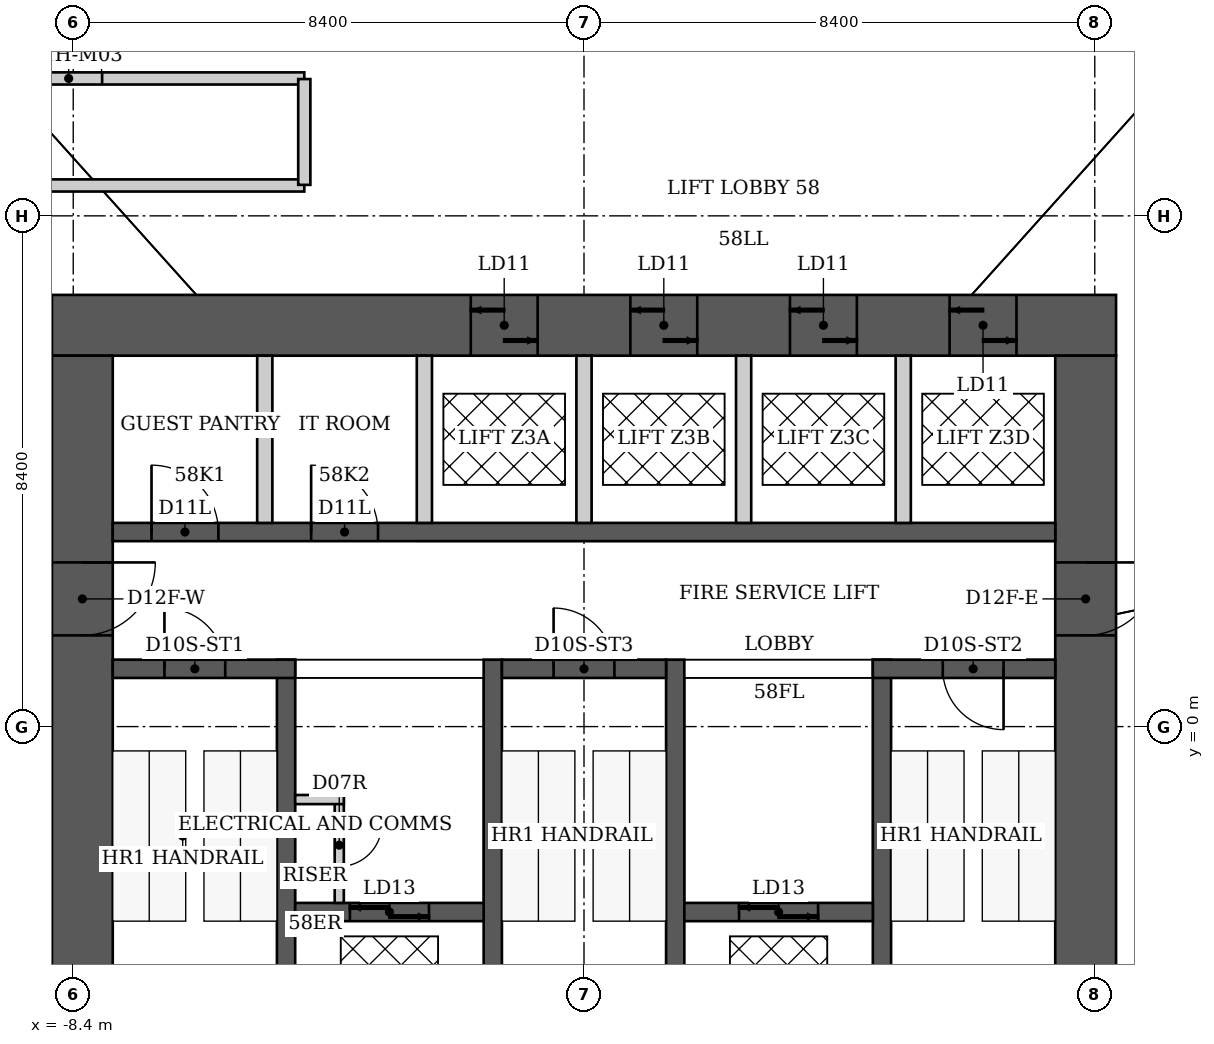
"""IFC4 building model, lengths in metres.
Left out: names, types, materials, properties, quantities, classifications, styles, units other than length and angle.
Written with IfcOpenShell. Run it as: python <this file> out.ifc"""

import sys

from ifc_helpers import new_model, si_unit, direction, frame, frame_2d, origin, place, context, subcontext, project, spatial, rectangle, extrude, element, fill, save


model = new_model("IFC4")
c1 = context("Model", 3, precision=1e-05, world=origin(), true_north=direction((0.0, 1.0)))
c2 = subcontext(c1, "Body", "Model", "MODEL_VIEW")
j1 = project(units=[si_unit("LENGTHUNIT", "METRE"), si_unit("PLANEANGLEUNIT", "RADIAN")], contexts=[c1])
p1 = place(None, origin())
s1 = spatial("IfcSite", under=j1, at=p1, CompositionType="ELEMENT")
p2 = place(p1, origin())
s2 = spatial("IfcBuilding", under=s1, at=p2, CompositionType="ELEMENT")
p3 = place(p2, frame((0.0, 0.0, 232.6)))
s3 = spatial("IfcBuildingStorey", under=s2, at=p3, CompositionType="ELEMENT", Elevation=232.6)
p4 = place(p3, frame((-8.75, 6.6, 0.0), z_axis=(0.0, 0.0, 1.0), x_axis=(1.0, 0.0, 0.0)))
e1 = element("IfcWall", 1, at=p4, inside=s3, PredefinedType="SHEAR", context=c2, shape_type="SweptSolid", body=[
    extrude(rectangle(XDim=17.5, YDim=1.0, at=frame_2d((8.75, 0.0))), origin(), (0.0, 0.0, 1.0), 3.8),
])
p5 = place(p4, frame((6.887, 0.0, 0.0)))
e2 = element("IfcOpeningElement", 2, at=p5, cuts=e1, PredefinedType="OPENING", context=c2, shape_type="SweptSolid", body=[
    extrude(rectangle(XDim=1.1, YDim=2.1, at=frame_2d((0.55, 1.05))), frame((0.0, 0.5, 0.0), z_axis=(0.0, -1.0, 0.0), x_axis=(1.0, 0.0, 0.0)), (0.0, 0.0, 1.0), 1.0),
])
p6 = place(p4, frame((9.512, 0.0, 0.0)))
e3 = element("IfcOpeningElement", 3, at=p6, cuts=e1, PredefinedType="OPENING", context=c2, shape_type="SweptSolid", body=[
    extrude(rectangle(XDim=1.1, YDim=2.1, at=frame_2d((0.55, 1.05))), frame((0.0, 0.5, 0.0), z_axis=(0.0, -1.0, 0.0), x_axis=(1.0, 0.0, 0.0)), (0.0, 0.0, 1.0), 1.0),
])
p7 = place(p4, frame((12.137, 0.0, 0.0)))
e4 = element("IfcOpeningElement", 4, at=p7, cuts=e1, PredefinedType="OPENING", context=c2, shape_type="SweptSolid", body=[
    extrude(rectangle(XDim=1.1, YDim=2.1, at=frame_2d((0.55, 1.05))), frame((0.0, 0.5, 0.0), z_axis=(0.0, -1.0, 0.0), x_axis=(1.0, 0.0, 0.0)), (0.0, 0.0, 1.0), 1.0),
])
p8 = place(p4, frame((14.762, 0.0, 0.0)))
e5 = element("IfcOpeningElement", 5, at=p8, cuts=e1, PredefinedType="OPENING", context=c2, shape_type="SweptSolid", body=[
    extrude(rectangle(XDim=1.1, YDim=2.1, at=frame_2d((0.55, 1.05))), frame((0.0, 0.5, 0.0), z_axis=(0.0, -1.0, 0.0), x_axis=(1.0, 0.0, 0.0)), (0.0, 0.0, 1.0), 1.0),
])
p9 = place(p3, frame((-8.25, -6.1, 0.0), z_axis=(0.0, 0.0, 1.0), x_axis=(0.0, 1.0, 0.0)))
e6 = element("IfcWall", 6, at=p9, inside=s3, PredefinedType="SHEAR", context=c2, shape_type="SweptSolid", body=[
    extrude(rectangle(XDim=12.2, YDim=1.0, at=frame_2d((6.1, 0.0))), origin(), (0.0, 0.0, 1.0), 3.8),
])
p10 = place(p9, frame((7.6, 0.0, 0.0)))
e7 = element("IfcOpeningElement", 7, at=p10, cuts=e6, PredefinedType="OPENING", context=c2, shape_type="SweptSolid", body=[
    extrude(rectangle(XDim=1.2, YDim=2.2, at=frame_2d((0.6, 1.1))), frame((0.0, 0.5, 0.0), z_axis=(0.0, -1.0, 0.0), x_axis=(1.0, 0.0, 0.0)), (0.0, 0.0, 1.0), 1.0),
])
p11 = place(p3, frame((8.25, -6.1, 0.0), z_axis=(0.0, 0.0, 1.0), x_axis=(0.0, 1.0, 0.0)))
e8 = element("IfcWall", 8, at=p11, inside=s3, PredefinedType="SHEAR", context=c2, shape_type="SweptSolid", body=[
    extrude(rectangle(XDim=12.2, YDim=1.0, at=frame_2d((6.1, 0.0))), origin(), (0.0, 0.0, 1.0), 3.8),
])
p12 = place(p11, frame((7.6, 0.0, 0.0)))
e9 = element("IfcOpeningElement", 9, at=p12, cuts=e8, PredefinedType="OPENING", context=c2, shape_type="SweptSolid", body=[
    extrude(rectangle(XDim=1.2, YDim=2.2, at=frame_2d((0.6, 1.1))), frame((0.0, 0.5, 0.0), z_axis=(0.0, -1.0, 0.0), x_axis=(1.0, 0.0, 0.0)), (0.0, 0.0, 1.0), 1.0),
])
for number, where, z_axis, x_axis in (
    (10, (-4.9, -6.1, 0.0), (0.0, 0.0, 1.0), (0.0, 1.0, 0.0)),
    (11, (-1.5, -6.1, 0.0), (0.0, 0.0, 1.0), (0.0, 1.0, 0.0)),
    (12, (1.5, -6.1, 0.0), (0.0, 0.0, 1.0), (0.0, 1.0, 0.0)),
    (13, (4.9, -6.1, 0.0), (0.0, 0.0, 1.0), (0.0, 1.0, 0.0)),
):
    element("IfcWall", number, at=place(p3, frame(where, z_axis=z_axis, x_axis=x_axis)), inside=s3, PredefinedType="SHEAR", context=c2, shape_type="SweptSolid", body=[
        extrude(rectangle(XDim=7.2, YDim=0.3, at=frame_2d((3.6, 0.0))), origin(), (0.0, 0.0, 1.0), 3.8),
    ])
p13 = place(p3, frame((-7.75, 0.95, 0.0), z_axis=(0.0, 0.0, 1.0), x_axis=(1.0, 0.0, 0.0)))
e14 = element("IfcWall", 14, at=p13, inside=s3, PredefinedType="SHEAR", context=c2, shape_type="SweptSolid", body=[
    extrude(rectangle(XDim=3.0, YDim=0.3, at=frame_2d((1.5, 0.0))), origin(), (0.0, 0.0, 1.0), 3.8),
])
p14 = place(p13, frame((0.85, 0.0, 0.0)))
e15 = element("IfcOpeningElement", 15, at=p14, cuts=e14, PredefinedType="OPENING", context=c2, shape_type="SweptSolid", body=[
    extrude(rectangle(XDim=1.0, YDim=2.2, at=frame_2d((0.5, 1.1))), frame((0.0, 0.15, 0.0), z_axis=(0.0, -1.0, 0.0), x_axis=(1.0, 0.0, 0.0)), (0.0, 0.0, 1.0), 0.3),
])
p15 = place(p3, frame((-1.35, 0.95, 0.0), z_axis=(0.0, 0.0, 1.0), x_axis=(1.0, 0.0, 0.0)))
e16 = element("IfcWall", 16, at=p15, inside=s3, PredefinedType="SHEAR", context=c2, shape_type="SweptSolid", body=[
    extrude(rectangle(XDim=2.7, YDim=0.3, at=frame_2d((1.35, 0.0))), origin(), (0.0, 0.0, 1.0), 3.8),
])
p16 = place(p15, frame((0.85, 0.0, 0.0)))
e17 = element("IfcOpeningElement", 17, at=p16, cuts=e16, PredefinedType="OPENING", context=c2, shape_type="SweptSolid", body=[
    extrude(rectangle(XDim=1.0, YDim=2.2, at=frame_2d((0.5, 1.1))), frame((0.0, 0.15, 0.0), z_axis=(0.0, -1.0, 0.0), x_axis=(1.0, 0.0, 0.0)), (0.0, 0.0, 1.0), 0.3),
])
p17 = place(p3, frame((4.75, 0.95, 0.0), z_axis=(0.0, 0.0, 1.0), x_axis=(1.0, 0.0, 0.0)))
e18 = element("IfcWall", 18, at=p17, inside=s3, PredefinedType="SHEAR", context=c2, shape_type="SweptSolid", body=[
    extrude(rectangle(XDim=3.0, YDim=0.3, at=frame_2d((1.5, 0.0))), origin(), (0.0, 0.0, 1.0), 3.8),
])
p18 = place(p17, frame((1.15, 0.0, 0.0)))
e19 = element("IfcOpeningElement", 19, at=p18, cuts=e18, PredefinedType="OPENING", context=c2, shape_type="SweptSolid", body=[
    extrude(rectangle(XDim=1.0, YDim=2.2, at=frame_2d((0.5, 1.1))), frame((0.0, 0.15, 0.0), z_axis=(0.0, -1.0, 0.0), x_axis=(1.0, 0.0, 0.0)), (0.0, 0.0, 1.0), 0.3),
])
p19 = place(p3, frame((-4.75, -3.05, 0.0), z_axis=(0.0, 0.0, 1.0), x_axis=(1.0, 0.0, 0.0)))
e20 = element("IfcWall", 20, at=p19, inside=s3, PredefinedType="SHEAR", context=c2, shape_type="SweptSolid", body=[
    extrude(rectangle(XDim=3.1, YDim=0.3, at=frame_2d((1.55, 0.0))), origin(), (0.0, 0.0, 1.0), 3.8),
])
p20 = place(p19, frame((0.9, 0.0, 0.0)))
e21 = element("IfcOpeningElement", 21, at=p20, cuts=e20, PredefinedType="OPENING", context=c2, shape_type="SweptSolid", body=[
    extrude(rectangle(XDim=1.3, YDim=2.1, at=frame_2d((0.65, 1.05))), frame((0.0, 0.15, 0.0), z_axis=(0.0, -1.0, 0.0), x_axis=(1.0, 0.0, 0.0)), (0.0, 0.0, 1.0), 0.3),
])
p21 = place(p3, frame((1.65, -3.05, 0.0), z_axis=(0.0, 0.0, 1.0), x_axis=(1.0, 0.0, 0.0)))
e22 = element("IfcWall", 22, at=p21, inside=s3, PredefinedType="SHEAR", context=c2, shape_type="SweptSolid", body=[
    extrude(rectangle(XDim=3.1, YDim=0.3, at=frame_2d((1.55, 0.0))), origin(), (0.0, 0.0, 1.0), 3.8),
])
p22 = place(p21, frame((0.9, 0.0, 0.0)))
e23 = element("IfcOpeningElement", 23, at=p22, cuts=e22, PredefinedType="OPENING", context=c2, shape_type="SweptSolid", body=[
    extrude(rectangle(XDim=1.3, YDim=2.1, at=frame_2d((0.65, 1.05))), frame((0.0, 0.15, 0.0), z_axis=(0.0, -1.0, 0.0), x_axis=(1.0, 0.0, 0.0)), (0.0, 0.0, 1.0), 0.3),
])
p23 = place(p3, frame((-7.75, 3.2, 0.0), z_axis=(0.0, 0.0, 1.0), x_axis=(1.0, 0.0, 0.0)))
e24 = element("IfcWall", 24, at=p23, inside=s3, PredefinedType="SHEAR", context=c2, shape_type="SweptSolid", body=[
    extrude(rectangle(XDim=15.5, YDim=0.3, at=frame_2d((7.75, 0.0))), origin(), (0.0, 0.0, 1.0), 3.8),
])
p24 = place(p23, frame((0.637, 0.0, 0.0)))
e25 = element("IfcOpeningElement", 25, at=p24, cuts=e24, PredefinedType="OPENING", context=c2, shape_type="SweptSolid", body=[
    extrude(rectangle(XDim=1.1, YDim=2.2, at=frame_2d((0.55, 1.1))), frame((0.0, 0.15, 0.0), z_axis=(0.0, -1.0, 0.0), x_axis=(1.0, 0.0, 0.0)), (0.0, 0.0, 1.0), 0.3),
])
p25 = place(p23, frame((3.262, 0.0, 0.0)))
e26 = element("IfcOpeningElement", 26, at=p25, cuts=e24, PredefinedType="OPENING", context=c2, shape_type="SweptSolid", body=[
    extrude(rectangle(XDim=1.1, YDim=2.2, at=frame_2d((0.55, 1.1))), frame((0.0, 0.15, 0.0), z_axis=(0.0, -1.0, 0.0), x_axis=(1.0, 0.0, 0.0)), (0.0, 0.0, 1.0), 0.3),
])
for number, where, z_axis, x_axis in (
    (27, (-5.25, 3.35, 0.0), (0.0, 0.0, 1.0), (0.0, 1.0, 0.0)),
    (28, (-2.625, 3.35, 0.0), (0.0, 0.0, 1.0), (0.0, 1.0, 0.0)),
    (29, (0.0, 3.35, 0.0), (0.0, 0.0, 1.0), (0.0, 1.0, 0.0)),
    (30, (2.625, 3.35, 0.0), (0.0, 0.0, 1.0), (0.0, 1.0, 0.0)),
    (31, (5.25, 3.35, 0.0), (0.0, 0.0, 1.0), (0.0, 1.0, 0.0)),
):
    element("IfcWall", number, at=place(p3, frame(where, z_axis=z_axis, x_axis=x_axis)), inside=s3, PredefinedType="PARTITIONING", context=c2, shape_type="SweptSolid", body=[
        extrude(rectangle(XDim=2.75, YDim=0.25, at=frame_2d((1.375, 0.0))), origin(), (0.0, 0.0, 1.0), 3.8),
    ])
p26 = place(p3, frame((-12.66, -3.39, 0.0), z_axis=(0.0, 0.0, 1.0), x_axis=(0.499511590934, -0.866307203319, 0.0)))
e32 = element("IfcWall", 32, at=p26, inside=s3, PredefinedType="PARTITIONING", context=c2, shape_type="SweptSolid", body=[
    extrude(rectangle(XDim=9.189, YDim=0.2, at=frame_2d((4.594, 0.0))), origin(), (0.0, 0.0, 1.0), 3.64),
])
p27 = place(p26, frame((4.094, 0.0, 0.0)))
e33 = element("IfcOpeningElement", 33, at=p27, cuts=e32, PredefinedType="OPENING", context=c2, shape_type="SweptSolid", body=[
    extrude(rectangle(XDim=1.0, YDim=2.13, at=frame_2d((0.5, 1.065))), frame((0.0, 0.1, 0.0), z_axis=(0.0, -1.0, 0.0), x_axis=(1.0, 0.0, 0.0)), (0.0, 0.0, 1.0), 0.2),
])
p28 = place(p3, frame((-12.35, 10.66, 0.0), z_axis=(0.0, 0.0, 1.0), x_axis=(1.0, 0.0, 0.0)))
e34 = element("IfcWall", 34, at=p28, inside=s3, PredefinedType="PARTITIONING", context=c2, shape_type="SweptSolid", body=[
    extrude(rectangle(XDim=7.75, YDim=0.2, at=frame_2d((3.875, 0.0))), origin(), (0.0, 0.0, 1.0), 3.64),
])
p29 = place(p28, frame((3.325, 0.0, 0.0)))
e35 = element("IfcOpeningElement", 35, at=p29, cuts=e34, PredefinedType="OPENING", context=c2, shape_type="SweptSolid", body=[
    extrude(rectangle(XDim=1.1, YDim=2.2, at=frame_2d((0.55, 1.1))), frame((0.0, 0.1, 0.0), z_axis=(0.0, -1.0, 0.0), x_axis=(1.0, 0.0, 0.0)), (0.0, 0.0, 1.0), 0.2),
])
p30 = place(p3, frame((-4.6, 8.9, 0.0), z_axis=(0.0, 0.0, 1.0), x_axis=(-1.0, 0.0, 0.0)))
e36 = element("IfcWall", 36, at=p30, inside=s3, PredefinedType="PARTITIONING", context=c2, shape_type="SweptSolid", body=[
    extrude(rectangle(XDim=5.95, YDim=0.2, at=frame_2d((2.975, 0.0))), origin(), (0.0, 0.0, 1.0), 3.64),
])
p31 = place(p3, frame((-4.6, 10.65, 0.0), z_axis=(0.0, 0.0, 1.0), x_axis=(0.0, -1.0, 0.0)))
e37 = element("IfcWall", 37, at=p31, inside=s3, PredefinedType="PARTITIONING", context=c2, shape_type="SweptSolid", body=[
    extrude(rectangle(XDim=1.74, YDim=0.2, at=frame_2d((0.87, 0.0))), origin(), (0.0, 0.0, 1.0), 3.64),
])
p32 = place(p3, frame((-4.025, -2.9, 0.0), z_axis=(0.0, 0.0, 1.0), x_axis=(0.0, 1.0, 0.0)))
e38 = element("IfcWall", 38, at=p32, inside=s3, PredefinedType="PARTITIONING", context=c2, shape_type="SweptSolid", body=[
    extrude(rectangle(XDim=1.775, YDim=0.15, at=frame_2d((0.887, 0.0))), origin(), (0.0, 0.0, 1.0), 3.64),
])
p33 = place(p32, frame((0.6, 0.0, 0.0)))
e39 = element("IfcOpeningElement", 39, at=p33, cuts=e38, PredefinedType="OPENING", context=c2, shape_type="SweptSolid", body=[
    extrude(rectangle(XDim=0.7, YDim=2.1, at=frame_2d((0.35, 1.05))), frame((0.0, 0.075, 0.0), z_axis=(0.0, -1.0, 0.0), x_axis=(1.0, 0.0, 0.0)), (0.0, 0.0, 1.0), 0.15),
])
p34 = place(p3, frame((-4.75, -1.2, 0.0), z_axis=(0.0, 0.0, 1.0), x_axis=(1.0, 0.0, 0.0)))
e40 = element("IfcWall", 40, at=p34, inside=s3, PredefinedType="PARTITIONING", context=c2, shape_type="SweptSolid", body=[
    extrude(rectangle(XDim=0.8, YDim=0.15, at=frame_2d((0.4, 0.0))), origin(), (0.0, 0.0, 1.0), 3.64),
])
p35 = place(p29, origin())
e41 = element("IfcDoor", 41, at=p35, inside=s3, OperationType="SINGLE_SWING_LEFT", PredefinedType="DOOR", context=c2, shape_type="SweptSolid", body=[
    extrude(rectangle(XDim=1.1, YDim=2.2, at=frame_2d((0.55, 1.1))), frame((0.0, 0.025, 0.0), z_axis=(0.0, -1.0, 0.0), x_axis=(1.0, 0.0, 0.0)), (0.0, 0.0, 1.0), 0.05),
])
fill(e35, e41)
p36 = place(p14, origin())
e42 = element("IfcDoor", 42, at=p36, inside=s3, OperationType="SINGLE_SWING_LEFT", PredefinedType="DOOR", context=c2, shape_type="SweptSolid", body=[
    extrude(rectangle(XDim=1.0, YDim=2.2, at=frame_2d((0.5, 1.1))), frame((0.0, 0.025, 0.0), z_axis=(0.0, -1.0, 0.0), x_axis=(1.0, 0.0, 0.0)), (0.0, 0.0, 1.0), 0.05),
])
fill(e15, e42)
p37 = place(p16, origin())
e43 = element("IfcDoor", 43, at=p37, inside=s3, OperationType="SINGLE_SWING_LEFT", PredefinedType="DOOR", context=c2, shape_type="SweptSolid", body=[
    extrude(rectangle(XDim=1.0, YDim=2.2, at=frame_2d((0.5, 1.1))), frame((0.0, 0.025, 0.0), z_axis=(0.0, -1.0, 0.0), x_axis=(1.0, 0.0, 0.0)), (0.0, 0.0, 1.0), 0.05),
])
fill(e17, e43)
p38 = place(p18, origin())
e44 = element("IfcDoor", 44, at=p38, inside=s3, OperationType="SINGLE_SWING_RIGHT", PredefinedType="DOOR", context=c2, shape_type="SweptSolid", body=[
    extrude(rectangle(XDim=1.0, YDim=2.2, at=frame_2d((0.5, 1.1))), frame((0.0, 0.025, 0.0), z_axis=(0.0, -1.0, 0.0), x_axis=(1.0, 0.0, 0.0)), (0.0, 0.0, 1.0), 0.05),
])
fill(e19, e44)
p39 = place(p10, origin())
e45 = element("IfcDoor", 45, at=p39, inside=s3, OperationType="SINGLE_SWING_RIGHT", PredefinedType="DOOR", context=c2, shape_type="SweptSolid", body=[
    extrude(rectangle(XDim=1.2, YDim=2.2, at=frame_2d((0.6, 1.1))), frame((0.0, 0.025, 0.0), z_axis=(0.0, -1.0, 0.0), x_axis=(1.0, 0.0, 0.0)), (0.0, 0.0, 1.0), 0.05),
])
fill(e7, e45)
p40 = place(p12, origin())
e46 = element("IfcDoor", 46, at=p40, inside=s3, OperationType="SINGLE_SWING_RIGHT", PredefinedType="DOOR", context=c2, shape_type="SweptSolid", body=[
    extrude(rectangle(XDim=1.2, YDim=2.2, at=frame_2d((0.6, 1.1))), frame((0.0, 0.025, 0.0), z_axis=(0.0, -1.0, 0.0), x_axis=(1.0, 0.0, 0.0)), (0.0, 0.0, 1.0), 0.05),
])
fill(e9, e46)
p41 = place(p33, origin())
e47 = element("IfcDoor", 47, at=p41, inside=s3, OperationType="SINGLE_SWING_RIGHT", PredefinedType="DOOR", context=c2, shape_type="SweptSolid", body=[
    extrude(rectangle(XDim=0.7, YDim=2.1, at=frame_2d((0.35, 1.05))), frame((0.0, 0.025, 0.0), z_axis=(0.0, -1.0, 0.0), x_axis=(1.0, 0.0, 0.0)), (0.0, 0.0, 1.0), 0.05),
])
fill(e39, e47)
p42 = place(p24, origin())
e48 = element("IfcDoor", 48, at=p42, inside=s3, OperationType="SINGLE_SWING_LEFT", PredefinedType="DOOR", context=c2, shape_type="SweptSolid", body=[
    extrude(rectangle(XDim=1.1, YDim=2.2, at=frame_2d((0.55, 1.1))), frame((0.0, 0.025, 0.0), z_axis=(0.0, -1.0, 0.0), x_axis=(1.0, 0.0, 0.0)), (0.0, 0.0, 1.0), 0.05),
])
fill(e25, e48)
p43 = place(p25, origin())
e49 = element("IfcDoor", 49, at=p43, inside=s3, OperationType="SINGLE_SWING_LEFT", PredefinedType="DOOR", context=c2, shape_type="SweptSolid", body=[
    extrude(rectangle(XDim=1.1, YDim=2.2, at=frame_2d((0.55, 1.1))), frame((0.0, 0.025, 0.0), z_axis=(0.0, -1.0, 0.0), x_axis=(1.0, 0.0, 0.0)), (0.0, 0.0, 1.0), 0.05),
])
fill(e26, e49)
p44 = place(p5, origin())
e50 = element("IfcDoor", 50, at=p44, inside=s3, OperationType="DOUBLE_DOOR_SLIDING", PredefinedType="DOOR", context=c2, shape_type="SweptSolid", body=[
    extrude(rectangle(XDim=1.1, YDim=2.1, at=frame_2d((0.55, 1.05))), frame((0.0, 0.025, 0.0), z_axis=(0.0, -1.0, 0.0), x_axis=(1.0, 0.0, 0.0)), (0.0, 0.0, 1.0), 0.05),
])
fill(e2, e50)
p45 = place(p6, origin())
e51 = element("IfcDoor", 51, at=p45, inside=s3, OperationType="DOUBLE_DOOR_SLIDING", PredefinedType="DOOR", context=c2, shape_type="SweptSolid", body=[
    extrude(rectangle(XDim=1.1, YDim=2.1, at=frame_2d((0.55, 1.05))), frame((0.0, 0.025, 0.0), z_axis=(0.0, -1.0, 0.0), x_axis=(1.0, 0.0, 0.0)), (0.0, 0.0, 1.0), 0.05),
])
fill(e3, e51)
p46 = place(p7, origin())
e52 = element("IfcDoor", 52, at=p46, inside=s3, OperationType="DOUBLE_DOOR_SLIDING", PredefinedType="DOOR", context=c2, shape_type="SweptSolid", body=[
    extrude(rectangle(XDim=1.1, YDim=2.1, at=frame_2d((0.55, 1.05))), frame((0.0, 0.025, 0.0), z_axis=(0.0, -1.0, 0.0), x_axis=(1.0, 0.0, 0.0)), (0.0, 0.0, 1.0), 0.05),
])
fill(e4, e52)
p47 = place(p8, origin())
e53 = element("IfcDoor", 53, at=p47, inside=s3, OperationType="DOUBLE_DOOR_SLIDING", PredefinedType="DOOR", context=c2, shape_type="SweptSolid", body=[
    extrude(rectangle(XDim=1.1, YDim=2.1, at=frame_2d((0.55, 1.05))), frame((0.0, 0.025, 0.0), z_axis=(0.0, -1.0, 0.0), x_axis=(1.0, 0.0, 0.0)), (0.0, 0.0, 1.0), 0.05),
])
fill(e5, e53)
p48 = place(p20, origin())
e54 = element("IfcDoor", 54, at=p48, inside=s3, OperationType="DOUBLE_DOOR_SLIDING", PredefinedType="DOOR", context=c2, shape_type="SweptSolid", body=[
    extrude(rectangle(XDim=1.3, YDim=2.1, at=frame_2d((0.65, 1.05))), frame((0.0, 0.025, 0.0), z_axis=(0.0, -1.0, 0.0), x_axis=(1.0, 0.0, 0.0)), (0.0, 0.0, 1.0), 0.05),
])
fill(e21, e54)
p49 = place(p22, origin())
e55 = element("IfcDoor", 55, at=p49, inside=s3, OperationType="DOUBLE_DOOR_SLIDING", PredefinedType="DOOR", context=c2, shape_type="SweptSolid", body=[
    extrude(rectangle(XDim=1.3, YDim=2.1, at=frame_2d((0.65, 1.05))), frame((0.0, 0.025, 0.0), z_axis=(0.0, -1.0, 0.0), x_axis=(1.0, 0.0, 0.0)), (0.0, 0.0, 1.0), 0.05),
])
fill(e23, e55)
save(model, sys.argv[1])
